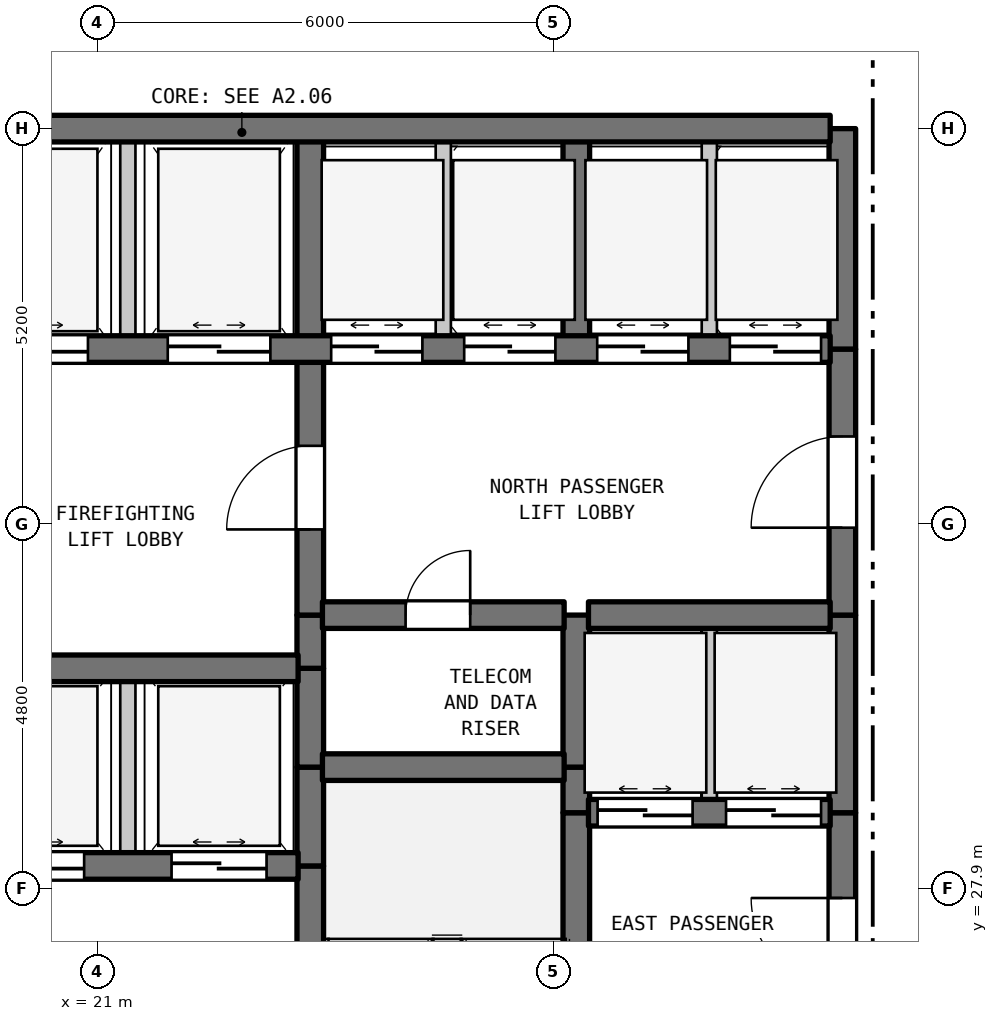
"""IFC4 building model, lengths in metres.
Left out: names, types, materials, properties, quantities, classifications, styles, units other than length and angle.
Written with IfcOpenShell. Run it as: python <this file> out.ifc"""

import sys

from ifc_helpers import new_model, si_unit, direction, frame, frame_2d, origin, place, context, subcontext, project, spatial, rectangle, extrude, element, fill, save


model = new_model("IFC4")
c1 = context("Model", 3, precision=1e-05, world=origin(), true_north=direction((0.0, 1.0)))
c2 = subcontext(c1, "Body", "Model", "MODEL_VIEW")
j1 = project(units=[si_unit("LENGTHUNIT", "METRE"), si_unit("PLANEANGLEUNIT", "RADIAN")], contexts=[c1])
p1 = place(None, origin())
s1 = spatial("IfcSite", under=j1, at=p1, CompositionType="ELEMENT")
p2 = place(p1, origin())
s2 = spatial("IfcBuilding", under=s1, at=p2, CompositionType="ELEMENT")
p3 = place(p2, frame((0.0, 0.0, 46.2)))
s3 = spatial("IfcBuildingStorey", under=s2, at=p3, CompositionType="ELEMENT", Elevation=46.2)
p4 = place(p3, frame((21.4, 28.2, 0.0), z_axis=(0.0, 0.0, 1.0), x_axis=(0.0, 1.0, 0.0)))
e1 = element("IfcWall", 1, at=p4, inside=s3, PredefinedType="STANDARD", context=c2, shape_type="SweptSolid", body=[
    extrude(rectangle(XDim=2.6, YDim=0.2, at=frame_2d((1.3, 0.0))), origin(), (0.0, 0.0, 1.0), 3.385),
])
p5 = place(p3, frame((21.4, 35.0, 0.0), z_axis=(0.0, 0.0, 1.0), x_axis=(0.0, 1.0, 0.0)))
e2 = element("IfcWall", 2, at=p5, inside=s3, PredefinedType="STANDARD", context=c2, shape_type="SweptSolid", body=[
    extrude(rectangle(XDim=2.9, YDim=0.2, at=frame_2d((1.45, 0.0))), origin(), (0.0, 0.0, 1.0), 3.385),
])
p6 = place(p3, frame((23.8, 22.7, 0.0), z_axis=(0.0, 0.0, 1.0), x_axis=(0.0, 1.0, 0.0)))
e3 = element("IfcWall", 3, at=p6, inside=s3, PredefinedType="SHEAR", context=c2, shape_type="SweptSolid", body=[
    extrude(rectangle(XDim=5.5, YDim=0.35, at=frame_2d((2.75, 0.0))), origin(), (0.0, 0.0, 1.0), 3.385),
])
p7 = place(p6, frame((0.235, 0.0, 0.0)))
e4 = element("IfcOpeningElement", 4, at=p7, cuts=e3, PredefinedType="OPENING", context=c2, shape_type="SweptSolid", body=[
    extrude(rectangle(XDim=1.1, YDim=2.15, at=frame_2d((0.55, 1.075))), frame((0.0, 0.185, 0.0), z_axis=(0.0, -1.0, 0.0), x_axis=(1.0, 0.0, 0.0)), (0.0, 0.0, 1.0), 0.37),
])
for number, where, z_axis, x_axis in (
    (5, (23.8, 28.2, 0.0), (0.0, 0.0, 1.0), (0.0, 1.0, 0.0)),
    (6, (23.8, 29.5, 0.0), (0.0, 0.0, 1.0), (0.0, 1.0, 0.0)),
):
    element("IfcWall", number, at=place(p3, frame(where, z_axis=z_axis, x_axis=x_axis)), inside=s3, PredefinedType="SHEAR", context=c2, shape_type="SweptSolid", body=[
        extrude(rectangle(XDim=1.3, YDim=0.35, at=frame_2d((0.65, 0.0))), origin(), (0.0, 0.0, 1.0), 3.385),
    ])
p8 = place(p3, frame((23.8, 30.8, 0.0), z_axis=(0.0, 0.0, 1.0), x_axis=(0.0, 1.0, 0.0)))
e7 = element("IfcWall", 7, at=p8, inside=s3, PredefinedType="SHEAR", context=c2, shape_type="SweptSolid", body=[
    extrude(rectangle(XDim=0.7, YDim=0.35, at=frame_2d((0.35, 0.0))), origin(), (0.0, 0.0, 1.0), 3.385),
])
p9 = place(p3, frame((23.8, 31.5, 0.0), z_axis=(0.0, 0.0, 1.0), x_axis=(0.0, 1.0, 0.0)))
e8 = element("IfcWall", 8, at=p9, inside=s3, PredefinedType="SHEAR", context=c2, shape_type="SweptSolid", body=[
    extrude(rectangle(XDim=3.5, YDim=0.35, at=frame_2d((1.75, 0.0))), origin(), (0.0, 0.0, 1.0), 3.385),
])
p10 = place(p9, frame((1.127, 0.0, 0.0)))
e9 = element("IfcOpeningElement", 9, at=p10, cuts=e8, PredefinedType="OPENING", context=c2, shape_type="SweptSolid", body=[
    extrude(rectangle(XDim=1.1, YDim=2.15, at=frame_2d((0.55, 1.075))), frame((0.0, 0.185, 0.0), z_axis=(0.0, -1.0, 0.0), x_axis=(1.0, 0.0, 0.0)), (0.0, 0.0, 1.0), 0.37),
])
p11 = place(p3, frame((23.8, 35.0, 0.0), z_axis=(0.0, 0.0, 1.0), x_axis=(0.0, 1.0, 0.0)))
e10 = element("IfcWall", 10, at=p11, inside=s3, PredefinedType="SHEAR", context=c2, shape_type="SweptSolid", body=[
    extrude(rectangle(XDim=2.9, YDim=0.35, at=frame_2d((1.45, 0.0))), origin(), (0.0, 0.0, 1.0), 3.385),
])
p12 = place(p3, frame((25.55, 35.0, 0.0), z_axis=(0.0, 0.0, 1.0), x_axis=(0.0, 1.0, 0.0)))
e11 = element("IfcWall", 11, at=p12, inside=s3, PredefinedType="STANDARD", context=c2, shape_type="SweptSolid", body=[
    extrude(rectangle(XDim=2.9, YDim=0.2, at=frame_2d((1.45, 0.0))), origin(), (0.0, 0.0, 1.0), 3.385),
])
p13 = place(p3, frame((27.3, 25.6, 0.0), z_axis=(0.0, 0.0, 1.0), x_axis=(0.0, 1.0, 0.0)))
e12 = element("IfcWall", 12, at=p13, inside=s3, PredefinedType="SHEAR", context=c2, shape_type="SweptSolid", body=[
    extrude(rectangle(XDim=3.3, YDim=0.35, at=frame_2d((1.65, 0.0))), origin(), (0.0, 0.0, 1.0), 3.385),
])
p14 = place(p3, frame((27.3, 28.9, 0.0), z_axis=(0.0, 0.0, 1.0), x_axis=(0.0, 1.0, 0.0)))
e13 = element("IfcWall", 13, at=p14, inside=s3, PredefinedType="SHEAR", context=c2, shape_type="SweptSolid", body=[
    extrude(rectangle(XDim=0.6, YDim=0.35, at=frame_2d((0.3, 0.0))), origin(), (0.0, 0.0, 1.0), 3.385),
])
p15 = place(p3, frame((27.3, 29.5, 0.0), z_axis=(0.0, 0.0, 1.0), x_axis=(0.0, 1.0, 0.0)))
e14 = element("IfcWall", 14, at=p15, inside=s3, PredefinedType="SHEAR", context=c2, shape_type="SweptSolid", body=[
    extrude(rectangle(XDim=2.0, YDim=0.35, at=frame_2d((1.0, 0.0))), origin(), (0.0, 0.0, 1.0), 3.385),
])
p16 = place(p3, frame((27.3, 35.0, 0.0), z_axis=(0.0, 0.0, 1.0), x_axis=(0.0, 1.0, 0.0)))
e15 = element("IfcWall", 15, at=p16, inside=s3, PredefinedType="SHEAR", context=c2, shape_type="SweptSolid", body=[
    extrude(rectangle(XDim=2.9, YDim=0.35, at=frame_2d((1.45, 0.0))), origin(), (0.0, 0.0, 1.0), 3.385),
])
p17 = place(p3, frame((29.05, 28.9, 0.0), z_axis=(0.0, 0.0, 1.0), x_axis=(0.0, 1.0, 0.0)))
e16 = element("IfcWall", 16, at=p17, inside=s3, PredefinedType="STANDARD", context=c2, shape_type="SweptSolid", body=[
    extrude(rectangle(XDim=2.6, YDim=0.2, at=frame_2d((1.3, 0.0))), origin(), (0.0, 0.0, 1.0), 3.385),
])
p18 = place(p3, frame((29.05, 35.0, 0.0), z_axis=(0.0, 0.0, 1.0), x_axis=(0.0, 1.0, 0.0)))
e17 = element("IfcWall", 17, at=p18, inside=s3, PredefinedType="STANDARD", context=c2, shape_type="SweptSolid", body=[
    extrude(rectangle(XDim=2.9, YDim=0.2, at=frame_2d((1.45, 0.0))), origin(), (0.0, 0.0, 1.0), 3.385),
])
p19 = place(p3, frame((30.8, 25.6, 0.0), z_axis=(0.0, 0.0, 1.0), x_axis=(0.0, 1.0, 0.0)))
e18 = element("IfcWall", 18, at=p19, inside=s3, PredefinedType="SHEAR", context=c2, shape_type="SweptSolid", body=[
    extrude(rectangle(XDim=3.3, YDim=0.35, at=frame_2d((1.65, 0.0))), origin(), (0.0, 0.0, 1.0), 3.385),
])
p20 = place(p19, frame((0.978, 0.0, 0.0)))
e19 = element("IfcOpeningElement", 19, at=p20, cuts=e18, PredefinedType="OPENING", context=c2, shape_type="SweptSolid", body=[
    extrude(rectangle(XDim=1.2, YDim=2.2, at=frame_2d((0.6, 1.1))), frame((0.0, 0.185, 0.0), z_axis=(0.0, -1.0, 0.0), x_axis=(1.0, 0.0, 0.0)), (0.0, 0.0, 1.0), 0.37),
])
p21 = place(p3, frame((30.8, 28.9, 0.0), z_axis=(0.0, 0.0, 1.0), x_axis=(0.0, 1.0, 0.0)))
e20 = element("IfcWall", 20, at=p21, inside=s3, PredefinedType="SHEAR", context=c2, shape_type="SweptSolid", body=[
    extrude(rectangle(XDim=2.6, YDim=0.35, at=frame_2d((1.3, 0.0))), origin(), (0.0, 0.0, 1.0), 3.385),
])
p22 = place(p3, frame((30.8, 31.5, 0.0), z_axis=(0.0, 0.0, 1.0), x_axis=(0.0, 1.0, 0.0)))
e21 = element("IfcWall", 21, at=p22, inside=s3, PredefinedType="SHEAR", context=c2, shape_type="SweptSolid", body=[
    extrude(rectangle(XDim=3.5, YDim=0.35, at=frame_2d((1.75, 0.0))), origin(), (0.0, 0.0, 1.0), 3.385),
])
p23 = place(p22, frame((1.15, 0.0, 0.0)))
e22 = element("IfcOpeningElement", 22, at=p23, cuts=e21, PredefinedType="OPENING", context=c2, shape_type="SweptSolid", body=[
    extrude(rectangle(XDim=1.2, YDim=2.2, at=frame_2d((0.6, 1.1))), frame((0.0, 0.185, 0.0), z_axis=(0.0, -1.0, 0.0), x_axis=(1.0, 0.0, 0.0)), (0.0, 0.0, 1.0), 0.37),
])
p24 = place(p3, frame((30.8, 35.0, 0.0), z_axis=(0.0, 0.0, 1.0), x_axis=(0.0, 1.0, 0.0)))
e23 = element("IfcWall", 23, at=p24, inside=s3, PredefinedType="SHEAR", context=c2, shape_type="SweptSolid", body=[
    extrude(rectangle(XDim=2.9, YDim=0.35, at=frame_2d((1.45, 0.0))), origin(), (0.0, 0.0, 1.0), 3.385),
])
p25 = place(p3, frame((19.16, 28.2, 0.0), z_axis=(0.0, 0.0, 1.0), x_axis=(1.0, 0.0, 0.0)))
e24 = element("IfcWall", 24, at=p25, inside=s3, PredefinedType="SHEAR", context=c2, shape_type="SweptSolid", body=[
    extrude(rectangle(XDim=4.48, YDim=0.35, at=frame_2d((2.24, 0.0))), origin(), (0.0, 0.0, 1.0), 3.385),
])
p26 = place(p25, frame((0.415, 0.0, 0.0)))
e25 = element("IfcOpeningElement", 25, at=p26, cuts=e24, PredefinedType="OPENING", context=c2, shape_type="SweptSolid", body=[
    extrude(rectangle(XDim=1.25, YDim=2.2, at=frame_2d((0.625, 1.1))), frame((0.0, 0.185, 0.0), z_axis=(0.0, -1.0, 0.0), x_axis=(1.0, 0.0, 0.0)), (0.0, 0.0, 1.0), 0.37),
])
p27 = place(p25, frame((2.815, 0.0, 0.0)))
e26 = element("IfcOpeningElement", 26, at=p27, cuts=e24, PredefinedType="OPENING", context=c2, shape_type="SweptSolid", body=[
    extrude(rectangle(XDim=1.25, YDim=2.2, at=frame_2d((0.625, 1.1))), frame((0.0, 0.185, 0.0), z_axis=(0.0, -1.0, 0.0), x_axis=(1.0, 0.0, 0.0)), (0.0, 0.0, 1.0), 0.37),
])
p28 = place(p3, frame((27.46, 28.9, 0.0), z_axis=(0.0, 0.0, 1.0), x_axis=(1.0, 0.0, 0.0)))
e27 = element("IfcWall", 27, at=p28, inside=s3, PredefinedType="SHEAR", context=c2, shape_type="SweptSolid", body=[
    extrude(rectangle(XDim=3.18, YDim=0.35, at=frame_2d((1.59, 0.0))), origin(), (0.0, 0.0, 1.0), 3.385),
])
p29 = place(p28, frame((0.12, 0.0, 0.0)))
e28 = element("IfcOpeningElement", 28, at=p29, cuts=e27, PredefinedType="OPENING", context=c2, shape_type="SweptSolid", body=[
    extrude(rectangle(XDim=1.25, YDim=2.2, at=frame_2d((0.625, 1.1))), frame((0.0, 0.185, 0.0), z_axis=(0.0, -1.0, 0.0), x_axis=(1.0, 0.0, 0.0)), (0.0, 0.0, 1.0), 0.37),
])
p30 = place(p28, frame((1.81, 0.0, 0.0)))
e29 = element("IfcOpeningElement", 29, at=p30, cuts=e27, PredefinedType="OPENING", context=c2, shape_type="SweptSolid", body=[
    extrude(rectangle(XDim=1.25, YDim=2.2, at=frame_2d((0.625, 1.1))), frame((0.0, 0.185, 0.0), z_axis=(0.0, -1.0, 0.0), x_axis=(1.0, 0.0, 0.0)), (0.0, 0.0, 1.0), 0.37),
])
p31 = place(p3, frame((23.96, 29.5, 0.0), z_axis=(0.0, 0.0, 1.0), x_axis=(1.0, 0.0, 0.0)))
e30 = element("IfcWall", 30, at=p31, inside=s3, PredefinedType="SHEAR", context=c2, shape_type="SweptSolid", body=[
    extrude(rectangle(XDim=3.18, YDim=0.35, at=frame_2d((1.59, 0.0))), origin(), (0.0, 0.0, 1.0), 3.385),
])
p32 = place(p3, frame((19.16, 30.8, 0.0), z_axis=(0.0, 0.0, 1.0), x_axis=(1.0, 0.0, 0.0)))
e31 = element("IfcWall", 31, at=p32, inside=s3, PredefinedType="SHEAR", context=c2, shape_type="SweptSolid", body=[
    extrude(rectangle(XDim=4.48, YDim=0.35, at=frame_2d((2.24, 0.0))), origin(), (0.0, 0.0, 1.0), 3.385),
])
p33 = place(p3, frame((23.96, 31.5, 0.0), z_axis=(0.0, 0.0, 1.0), x_axis=(1.0, 0.0, 0.0)))
e32 = element("IfcWall", 32, at=p33, inside=s3, PredefinedType="SHEAR", context=c2, shape_type="SweptSolid", body=[
    extrude(rectangle(XDim=3.18, YDim=0.35, at=frame_2d((1.59, 0.0))), origin(), (0.0, 0.0, 1.0), 3.385),
])
p34 = place(p33, frame((1.094, 0.0, 0.0)))
e33 = element("IfcOpeningElement", 33, at=p34, cuts=e32, PredefinedType="OPENING", context=c2, shape_type="SweptSolid", body=[
    extrude(rectangle(XDim=0.85, YDim=2.1, at=frame_2d((0.425, 1.05))), frame((0.0, 0.185, 0.0), z_axis=(0.0, -1.0, 0.0), x_axis=(1.0, 0.0, 0.0)), (0.0, 0.0, 1.0), 0.37),
])
p35 = place(p3, frame((27.46, 31.5, 0.0), z_axis=(0.0, 0.0, 1.0), x_axis=(1.0, 0.0, 0.0)))
e34 = element("IfcWall", 34, at=p35, inside=s3, PredefinedType="SHEAR", context=c2, shape_type="SweptSolid", body=[
    extrude(rectangle(XDim=3.18, YDim=0.35, at=frame_2d((1.59, 0.0))), origin(), (0.0, 0.0, 1.0), 3.385),
])
p36 = place(p3, frame((19.16, 35.0, 0.0), z_axis=(0.0, 0.0, 1.0), x_axis=(1.0, 0.0, 0.0)))
e35 = element("IfcWall", 35, at=p36, inside=s3, PredefinedType="SHEAR", context=c2, shape_type="SweptSolid", body=[
    extrude(rectangle(XDim=11.48, YDim=0.35, at=frame_2d((5.74, 0.0))), origin(), (0.0, 0.0, 1.0), 3.385),
])
p37 = place(p36, frame((0.365, 0.0, 0.0)))
e36 = element("IfcOpeningElement", 36, at=p37, cuts=e35, PredefinedType="OPENING", context=c2, shape_type="SweptSolid", body=[
    extrude(rectangle(XDim=1.35, YDim=2.2, at=frame_2d((0.675, 1.1))), frame((0.0, 0.185, 0.0), z_axis=(0.0, -1.0, 0.0), x_axis=(1.0, 0.0, 0.0)), (0.0, 0.0, 1.0), 0.37),
])
p38 = place(p36, frame((2.765, 0.0, 0.0)))
e37 = element("IfcOpeningElement", 37, at=p38, cuts=e35, PredefinedType="OPENING", context=c2, shape_type="SweptSolid", body=[
    extrude(rectangle(XDim=1.35, YDim=2.2, at=frame_2d((0.675, 1.1))), frame((0.0, 0.185, 0.0), z_axis=(0.0, -1.0, 0.0), x_axis=(1.0, 0.0, 0.0)), (0.0, 0.0, 1.0), 0.37),
])
p39 = place(p36, frame((4.915, 0.0, 0.0)))
e38 = element("IfcOpeningElement", 38, at=p39, cuts=e35, PredefinedType="OPENING", context=c2, shape_type="SweptSolid", body=[
    extrude(rectangle(XDim=1.2, YDim=2.2, at=frame_2d((0.6, 1.1))), frame((0.0, 0.185, 0.0), z_axis=(0.0, -1.0, 0.0), x_axis=(1.0, 0.0, 0.0)), (0.0, 0.0, 1.0), 0.37),
])
p40 = place(p36, frame((6.665, 0.0, 0.0)))
e39 = element("IfcOpeningElement", 39, at=p40, cuts=e35, PredefinedType="OPENING", context=c2, shape_type="SweptSolid", body=[
    extrude(rectangle(XDim=1.2, YDim=2.2, at=frame_2d((0.6, 1.1))), frame((0.0, 0.185, 0.0), z_axis=(0.0, -1.0, 0.0), x_axis=(1.0, 0.0, 0.0)), (0.0, 0.0, 1.0), 0.37),
])
p41 = place(p36, frame((8.415, 0.0, 0.0)))
e40 = element("IfcOpeningElement", 40, at=p41, cuts=e35, PredefinedType="OPENING", context=c2, shape_type="SweptSolid", body=[
    extrude(rectangle(XDim=1.2, YDim=2.2, at=frame_2d((0.6, 1.1))), frame((0.0, 0.185, 0.0), z_axis=(0.0, -1.0, 0.0), x_axis=(1.0, 0.0, 0.0)), (0.0, 0.0, 1.0), 0.37),
])
p42 = place(p36, frame((10.16, 0.0, 0.0)))
e41 = element("IfcOpeningElement", 41, at=p42, cuts=e35, PredefinedType="OPENING", context=c2, shape_type="SweptSolid", body=[
    extrude(rectangle(XDim=1.2, YDim=2.2, at=frame_2d((0.6, 1.1))), frame((0.0, 0.185, 0.0), z_axis=(0.0, -1.0, 0.0), x_axis=(1.0, 0.0, 0.0)), (0.0, 0.0, 1.0), 0.37),
])
p43 = place(p3, frame((19.16, 37.9, 0.0), z_axis=(0.0, 0.0, 1.0), x_axis=(1.0, 0.0, 0.0)))
e42 = element("IfcWall", 42, at=p43, inside=s3, PredefinedType="SHEAR", context=c2, shape_type="SweptSolid", body=[
    extrude(rectangle(XDim=11.48, YDim=0.35, at=frame_2d((5.74, 0.0))), origin(), (0.0, 0.0, 1.0), 3.385),
])
p44 = place(p10, origin())
e43 = element("IfcDoor", 43, at=p44, inside=s3, OperationType="SINGLE_SWING_LEFT", PredefinedType="DOOR", context=c2, shape_type="SweptSolid", body=[
    extrude(rectangle(XDim=1.1, YDim=2.15, at=frame_2d((0.55, 1.075))), frame((0.0, 0.025, 0.0), z_axis=(0.0, -1.0, 0.0), x_axis=(1.0, 0.0, 0.0)), (0.0, 0.0, 1.0), 0.05),
])
fill(e9, e43)
p45 = place(p20, origin())
e44 = element("IfcDoor", 44, at=p45, inside=s3, OperationType="SINGLE_SWING_RIGHT", PredefinedType="DOOR", context=c2, shape_type="SweptSolid", body=[
    extrude(rectangle(XDim=1.2, YDim=2.2, at=frame_2d((0.6, 1.1))), frame((0.0, 0.025, 0.0), z_axis=(0.0, -1.0, 0.0), x_axis=(1.0, 0.0, 0.0)), (0.0, 0.0, 1.0), 0.05),
])
fill(e19, e44)
p46 = place(p23, origin())
e45 = element("IfcDoor", 45, at=p46, inside=s3, OperationType="SINGLE_SWING_LEFT", PredefinedType="DOOR", context=c2, shape_type="SweptSolid", body=[
    extrude(rectangle(XDim=1.2, YDim=2.2, at=frame_2d((0.6, 1.1))), frame((0.0, 0.025, 0.0), z_axis=(0.0, -1.0, 0.0), x_axis=(1.0, 0.0, 0.0)), (0.0, 0.0, 1.0), 0.05),
])
fill(e22, e45)
p47 = place(p26, origin())
e46 = element("IfcDoor", 46, at=p47, inside=s3, OperationType="DOUBLE_DOOR_SLIDING", PredefinedType="DOOR", context=c2, shape_type="SweptSolid", body=[
    extrude(rectangle(XDim=1.25, YDim=2.2, at=frame_2d((0.625, 1.1))), frame((0.0, 0.025, 0.0), z_axis=(0.0, -1.0, 0.0), x_axis=(1.0, 0.0, 0.0)), (0.0, 0.0, 1.0), 0.05),
])
fill(e25, e46)
p48 = place(p27, origin())
e47 = element("IfcDoor", 47, at=p48, inside=s3, OperationType="DOUBLE_DOOR_SLIDING", PredefinedType="DOOR", context=c2, shape_type="SweptSolid", body=[
    extrude(rectangle(XDim=1.25, YDim=2.2, at=frame_2d((0.625, 1.1))), frame((0.0, 0.025, 0.0), z_axis=(0.0, -1.0, 0.0), x_axis=(1.0, 0.0, 0.0)), (0.0, 0.0, 1.0), 0.05),
])
fill(e26, e47)
p49 = place(p29, origin())
e48 = element("IfcDoor", 48, at=p49, inside=s3, OperationType="DOUBLE_DOOR_SLIDING", PredefinedType="DOOR", context=c2, shape_type="SweptSolid", body=[
    extrude(rectangle(XDim=1.25, YDim=2.2, at=frame_2d((0.625, 1.1))), frame((0.0, 0.025, 0.0), z_axis=(0.0, -1.0, 0.0), x_axis=(1.0, 0.0, 0.0)), (0.0, 0.0, 1.0), 0.05),
])
fill(e28, e48)
p50 = place(p30, origin())
e49 = element("IfcDoor", 49, at=p50, inside=s3, OperationType="DOUBLE_DOOR_SLIDING", PredefinedType="DOOR", context=c2, shape_type="SweptSolid", body=[
    extrude(rectangle(XDim=1.25, YDim=2.2, at=frame_2d((0.625, 1.1))), frame((0.0, 0.025, 0.0), z_axis=(0.0, -1.0, 0.0), x_axis=(1.0, 0.0, 0.0)), (0.0, 0.0, 1.0), 0.05),
])
fill(e29, e49)
p51 = place(p34, origin())
e50 = element("IfcDoor", 50, at=p51, inside=s3, OperationType="SINGLE_SWING_RIGHT", PredefinedType="DOOR", context=c2, shape_type="SweptSolid", body=[
    extrude(rectangle(XDim=0.85, YDim=2.1, at=frame_2d((0.425, 1.05))), frame((0.0, 0.025, 0.0), z_axis=(0.0, -1.0, 0.0), x_axis=(1.0, 0.0, 0.0)), (0.0, 0.0, 1.0), 0.05),
])
fill(e33, e50)
p52 = place(p37, origin())
e51 = element("IfcDoor", 51, at=p52, inside=s3, OperationType="DOUBLE_DOOR_SLIDING", PredefinedType="DOOR", context=c2, shape_type="SweptSolid", body=[
    extrude(rectangle(XDim=1.35, YDim=2.2, at=frame_2d((0.675, 1.1))), frame((0.0, 0.025, 0.0), z_axis=(0.0, -1.0, 0.0), x_axis=(1.0, 0.0, 0.0)), (0.0, 0.0, 1.0), 0.05),
])
fill(e36, e51)
p53 = place(p38, origin())
e52 = element("IfcDoor", 52, at=p53, inside=s3, OperationType="DOUBLE_DOOR_SLIDING", PredefinedType="DOOR", context=c2, shape_type="SweptSolid", body=[
    extrude(rectangle(XDim=1.35, YDim=2.2, at=frame_2d((0.675, 1.1))), frame((0.0, 0.025, 0.0), z_axis=(0.0, -1.0, 0.0), x_axis=(1.0, 0.0, 0.0)), (0.0, 0.0, 1.0), 0.05),
])
fill(e37, e52)
p54 = place(p39, origin())
e53 = element("IfcDoor", 53, at=p54, inside=s3, OperationType="DOUBLE_DOOR_SLIDING", PredefinedType="DOOR", context=c2, shape_type="SweptSolid", body=[
    extrude(rectangle(XDim=1.2, YDim=2.2, at=frame_2d((0.6, 1.1))), frame((0.0, 0.025, 0.0), z_axis=(0.0, -1.0, 0.0), x_axis=(1.0, 0.0, 0.0)), (0.0, 0.0, 1.0), 0.05),
])
fill(e38, e53)
p55 = place(p40, origin())
e54 = element("IfcDoor", 54, at=p55, inside=s3, OperationType="DOUBLE_DOOR_SLIDING", PredefinedType="DOOR", context=c2, shape_type="SweptSolid", body=[
    extrude(rectangle(XDim=1.2, YDim=2.2, at=frame_2d((0.6, 1.1))), frame((0.0, 0.025, 0.0), z_axis=(0.0, -1.0, 0.0), x_axis=(1.0, 0.0, 0.0)), (0.0, 0.0, 1.0), 0.05),
])
fill(e39, e54)
p56 = place(p41, origin())
e55 = element("IfcDoor", 55, at=p56, inside=s3, OperationType="DOUBLE_DOOR_SLIDING", PredefinedType="DOOR", context=c2, shape_type="SweptSolid", body=[
    extrude(rectangle(XDim=1.2, YDim=2.2, at=frame_2d((0.6, 1.1))), frame((0.0, 0.025, 0.0), z_axis=(0.0, -1.0, 0.0), x_axis=(1.0, 0.0, 0.0)), (0.0, 0.0, 1.0), 0.05),
])
fill(e40, e55)
p57 = place(p42, origin())
e56 = element("IfcDoor", 56, at=p57, inside=s3, OperationType="DOUBLE_DOOR_SLIDING", PredefinedType="DOOR", context=c2, shape_type="SweptSolid", body=[
    extrude(rectangle(XDim=1.2, YDim=2.2, at=frame_2d((0.6, 1.1))), frame((0.0, 0.025, 0.0), z_axis=(0.0, -1.0, 0.0), x_axis=(1.0, 0.0, 0.0)), (0.0, 0.0, 1.0), 0.05),
])
fill(e41, e56)
save(model, sys.argv[1])
